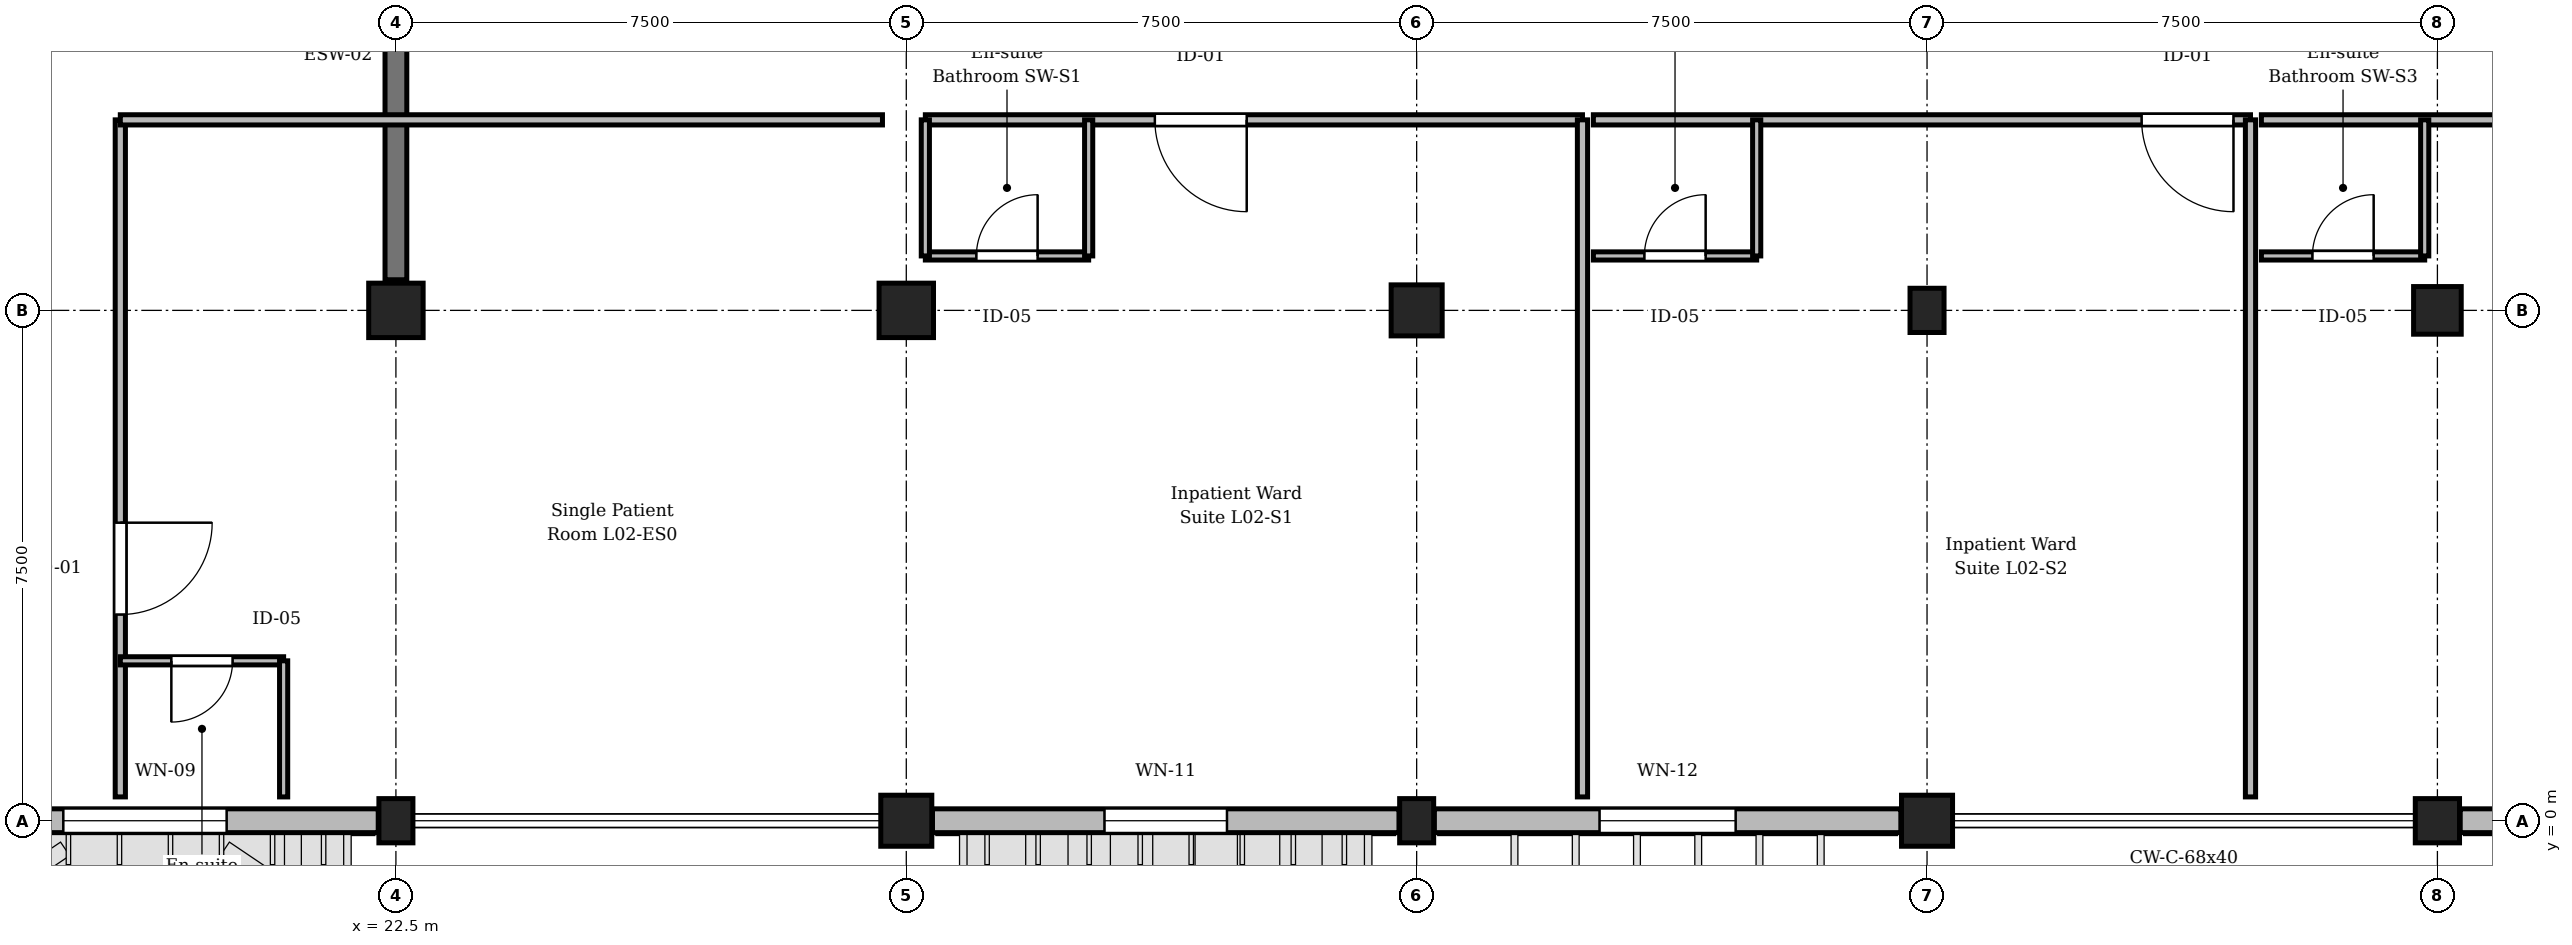
"""IFC4 building model, lengths in metres.
Left out: names, types, materials, properties, quantities, classifications, styles, units other than length and angle.
Written with IfcOpenShell. Run it as: python <this file> out.ifc"""

import sys

from ifc_helpers import new_model, si_unit, direction, frame, frame_2d, origin, origin_2d, place, context, subcontext, project, spatial, rectangle, extrude, element, fill, save


model = new_model("IFC4")
c1 = context("Model", 3, precision=1e-05, world=origin(), true_north=direction((0.0, 1.0)))
c2 = subcontext(c1, "Body", "Model", "MODEL_VIEW")
j1 = project(units=[si_unit("LENGTHUNIT", "METRE"), si_unit("PLANEANGLEUNIT", "RADIAN")], contexts=[c1])
p1 = place(None, origin())
s1 = spatial("IfcSite", under=j1, at=p1, CompositionType="ELEMENT")
p2 = place(p1, origin())
s2 = spatial("IfcBuilding", under=s1, at=p2, CompositionType="ELEMENT")
p3 = place(p2, frame((0.0, 0.0, 9.3)))
s3 = spatial("IfcBuildingStorey", under=s2, at=p3, CompositionType="ELEMENT", Elevation=9.3)
p4 = place(p3, frame((22.5, 0.0, 0.0), z_axis=(0.0, 0.0, 1.0), x_axis=(1.0, 0.0, 0.0)))
e1 = element("IfcColumn", 1, at=p4, inside=s3, PredefinedType="COLUMN", context=c2, shape_type="SweptSolid", body=[
    extrude(rectangle(XDim=0.5, YDim=0.65, at=origin_2d()), origin(), (0.0, 0.0, 1.0), 4.8),
])
p5 = place(p3, frame((22.5, 7.5, 0.0), z_axis=(0.0, 0.0, 1.0), x_axis=(1.0, 0.0, 0.0)))
e2 = element("IfcColumn", 2, at=p5, inside=s3, PredefinedType="COLUMN", context=c2, shape_type="SweptSolid", body=[
    extrude(rectangle(XDim=0.8, YDim=0.8, at=origin_2d()), origin(), (0.0, 0.0, 1.0), 4.8),
])
p6 = place(p3, frame((30.0, 0.0, 0.0), z_axis=(0.0, 0.0, 1.0), x_axis=(1.0, 0.0, 0.0)))
e3 = element("IfcColumn", 3, at=p6, inside=s3, PredefinedType="COLUMN", context=c2, shape_type="SweptSolid", body=[
    extrude(rectangle(XDim=0.75, YDim=0.75, at=origin_2d()), origin(), (0.0, 0.0, 1.0), 4.8),
])
p7 = place(p3, frame((30.0, 7.5, 0.0), z_axis=(0.0, 0.0, 1.0), x_axis=(1.0, 0.0, 0.0)))
e4 = element("IfcColumn", 4, at=p7, inside=s3, PredefinedType="COLUMN", context=c2, shape_type="SweptSolid", body=[
    extrude(rectangle(XDim=0.8, YDim=0.8, at=origin_2d()), origin(), (0.0, 0.0, 1.0), 4.8),
])
p8 = place(p3, frame((37.5, 0.0, 0.0), z_axis=(0.0, 0.0, 1.0), x_axis=(1.0, 0.0, 0.0)))
e5 = element("IfcColumn", 5, at=p8, inside=s3, PredefinedType="COLUMN", context=c2, shape_type="SweptSolid", body=[
    extrude(rectangle(XDim=0.5, YDim=0.65, at=origin_2d()), origin(), (0.0, 0.0, 1.0), 4.8),
])
for number, where, z_axis, x_axis in (
    (6, (37.5, 7.5, 0.0), (0.0, 0.0, 1.0), (1.0, 0.0, 0.0)),
    (7, (45.0, 0.0, 0.0), (0.0, 0.0, 1.0), (1.0, 0.0, 0.0)),
):
    element("IfcColumn", number, at=place(p3, frame(where, z_axis=z_axis, x_axis=x_axis)), inside=s3, PredefinedType="COLUMN", context=c2, shape_type="SweptSolid", body=[
        extrude(rectangle(XDim=0.75, YDim=0.75, at=origin_2d()), origin(), (0.0, 0.0, 1.0), 4.8),
    ])
p9 = place(p3, frame((45.0, 7.5, 0.0), z_axis=(0.0, 0.0, 1.0), x_axis=(1.0, 0.0, 0.0)))
e8 = element("IfcColumn", 8, at=p9, inside=s3, PredefinedType="COLUMN", context=c2, shape_type="SweptSolid", body=[
    extrude(rectangle(XDim=0.5, YDim=0.65, at=origin_2d()), origin(), (0.0, 0.0, 1.0), 4.8),
])
p10 = place(p3, frame((52.5, 0.0, 0.0), z_axis=(0.0, 0.0, 1.0), x_axis=(1.0, 0.0, 0.0)))
e9 = element("IfcColumn", 9, at=p10, inside=s3, PredefinedType="COLUMN", context=c2, shape_type="SweptSolid", body=[
    extrude(rectangle(XDim=0.65, YDim=0.65, at=origin_2d()), origin(), (0.0, 0.0, 1.0), 4.8),
])
p11 = place(p3, frame((52.5, 7.5, 0.0), z_axis=(0.0, 0.0, 1.0), x_axis=(1.0, 0.0, 0.0)))
e10 = element("IfcColumn", 10, at=p11, inside=s3, PredefinedType="COLUMN", context=c2, shape_type="SweptSolid", body=[
    extrude(rectangle(XDim=0.7, YDim=0.7, at=origin_2d()), origin(), (0.0, 0.0, 1.0), 4.8),
])
p12 = place(p3, frame((22.5, 7.95, 0.0), z_axis=(0.0, 0.0, 1.0), x_axis=(0.0, 1.0, 0.0)))
e11 = element("IfcWall", 11, at=p12, inside=s3, PredefinedType="SHEAR", context=c2, shape_type="SweptSolid", body=[
    extrude(rectangle(XDim=6.6, YDim=0.32, at=frame_2d((3.3, 0.0))), origin(), (0.0, 0.0, 1.0), 4.0),
])
p13 = place(p3, frame((22.24, 0.0, 0.0), z_axis=(0.0, 0.0, 1.0), x_axis=(-1.0, 0.0, 0.0)))
e12 = element("IfcWall", 12, at=p13, inside=s3, PredefinedType="STANDARD", context=c2, shape_type="SweptSolid", body=[
    extrude(rectangle(XDim=6.855, YDim=0.35, at=frame_2d((3.427, 0.0))), origin(), (0.0, 0.0, 1.0), 3.95),
])
p14 = place(p13, frame((2.228, 0.0, 0.9)))
e13 = element("IfcOpeningElement", 13, at=p14, cuts=e12, PredefinedType="OPENING", context=c2, shape_type="SweptSolid", body=[
    extrude(rectangle(XDim=2.4, YDim=2.1, at=frame_2d((1.2, 1.05))), frame((0.0, 0.185, 0.0), z_axis=(0.0, -1.0, 0.0), x_axis=(1.0, 0.0, 0.0)), (0.0, 0.0, 1.0), 0.37),
])
p15 = place(p3, frame((37.24, 0.0, 0.0), z_axis=(0.0, 0.0, 1.0), x_axis=(-1.0, 0.0, 0.0)))
e14 = element("IfcWall", 14, at=p15, inside=s3, PredefinedType="STANDARD", context=c2, shape_type="SweptSolid", body=[
    extrude(rectangle(XDim=6.855, YDim=0.35, at=frame_2d((3.427, 0.0))), origin(), (0.0, 0.0, 1.0), 3.95),
])
p16 = place(p15, frame((2.528, 0.0, 0.9)))
e15 = element("IfcOpeningElement", 15, at=p16, cuts=e14, PredefinedType="OPENING", context=c2, shape_type="SweptSolid", body=[
    extrude(rectangle(XDim=1.8, YDim=1.95, at=frame_2d((0.9, 0.975))), frame((0.0, 0.185, 0.0), z_axis=(0.0, -1.0, 0.0), x_axis=(1.0, 0.0, 0.0)), (0.0, 0.0, 1.0), 0.37),
])
p17 = place(p3, frame((44.615, 0.0, 0.0), z_axis=(0.0, 0.0, 1.0), x_axis=(-1.0, 0.0, 0.0)))
e16 = element("IfcWall", 16, at=p17, inside=s3, PredefinedType="STANDARD", context=c2, shape_type="SweptSolid", body=[
    extrude(rectangle(XDim=6.855, YDim=0.35, at=frame_2d((3.427, 0.0))), origin(), (0.0, 0.0, 1.0), 3.95),
])
p18 = place(p17, frame((2.427, 0.0, 0.9)))
e17 = element("IfcOpeningElement", 17, at=p18, cuts=e16, PredefinedType="OPENING", context=c2, shape_type="SweptSolid", body=[
    extrude(rectangle(XDim=2.0, YDim=1.95, at=frame_2d((1.0, 0.975))), frame((0.0, 0.185, 0.0), z_axis=(0.0, -1.0, 0.0), x_axis=(1.0, 0.0, 0.0)), (0.0, 0.0, 1.0), 0.37),
])
p19 = place(p3, frame((59.69, 0.0, 0.0), z_axis=(0.0, 0.0, 1.0), x_axis=(-1.0, 0.0, 0.0)))
e18 = element("IfcWall", 18, at=p19, inside=s3, PredefinedType="STANDARD", context=c2, shape_type="SweptSolid", body=[
    extrude(rectangle(XDim=6.855, YDim=0.35, at=frame_2d((3.427, 0.0))), origin(), (0.0, 0.0, 1.0), 3.95),
])
p20 = place(p19, frame((2.728, 0.0, 0.9)))
e19 = element("IfcOpeningElement", 19, at=p20, cuts=e18, PredefinedType="OPENING", context=c2, shape_type="SweptSolid", body=[
    extrude(rectangle(XDim=1.4, YDim=1.8, at=frame_2d((0.7, 0.9))), frame((0.0, 0.185, 0.0), z_axis=(0.0, -1.0, 0.0), x_axis=(1.0, 0.0, 0.0)), (0.0, 0.0, 1.0), 0.37),
])
p21 = place(p3, frame((18.45, 10.3, 0.0), z_axis=(0.0, 0.0, 1.0), x_axis=(0.0, -1.0, 0.0)))
e20 = element("IfcWall", 20, at=p21, inside=s3, PredefinedType="PARTITIONING", context=c2, shape_type="SweptSolid", body=[
    extrude(rectangle(XDim=9.95, YDim=0.15, at=frame_2d((4.975, 0.0))), origin(), (0.0, 0.0, 1.0), 4.535),
])
p22 = place(p21, frame((5.92, 0.0, 0.0)))
e21 = element("IfcOpeningElement", 21, at=p22, cuts=e20, PredefinedType="OPENING", context=c2, shape_type="SweptSolid", body=[
    extrude(rectangle(XDim=1.35, YDim=2.25, at=frame_2d((0.675, 1.125))), frame((0.0, 0.085, 0.0), z_axis=(0.0, -1.0, 0.0), x_axis=(1.0, 0.0, 0.0)), (0.0, 0.0, 1.0), 0.17),
])
p23 = place(p3, frame((20.85, 2.35, 0.0), z_axis=(0.0, 0.0, 1.0), x_axis=(-1.0, 0.0, 0.0)))
e22 = element("IfcWall", 22, at=p23, inside=s3, PredefinedType="PARTITIONING", context=c2, shape_type="SweptSolid", body=[
    extrude(rectangle(XDim=2.4, YDim=0.12, at=frame_2d((1.2, 0.0))), origin(), (0.0, 0.0, 1.0), 4.535),
])
p24 = place(p23, frame((0.75, 0.0, 0.0)))
e23 = element("IfcOpeningElement", 23, at=p24, cuts=e22, PredefinedType="OPENING", context=c2, shape_type="SweptSolid", body=[
    extrude(rectangle(XDim=0.9, YDim=2.1, at=frame_2d((0.45, 1.05))), frame((0.0, 0.07, 0.0), z_axis=(0.0, -1.0, 0.0), x_axis=(1.0, 0.0, 0.0)), (0.0, 0.0, 1.0), 0.14),
])
p25 = place(p3, frame((20.85, 0.35, 0.0), z_axis=(0.0, 0.0, 1.0), x_axis=(0.0, 1.0, 0.0)))
e24 = element("IfcWall", 24, at=p25, inside=s3, PredefinedType="PARTITIONING", context=c2, shape_type="SweptSolid", body=[
    extrude(rectangle(XDim=2.0, YDim=0.12, at=frame_2d((1.0, 0.0))), origin(), (0.0, 0.0, 1.0), 4.535),
])
p26 = place(p3, frame((39.937, 10.3, 0.0), z_axis=(0.0, 0.0, 1.0), x_axis=(-1.0, 0.0, 0.0)))
e25 = element("IfcWall", 25, at=p26, inside=s3, PredefinedType="PARTITIONING", context=c2, shape_type="SweptSolid", body=[
    extrude(rectangle(XDim=9.657, YDim=0.15, at=frame_2d((4.828, 0.0))), origin(), (0.0, 0.0, 1.0), 4.535),
])
p27 = place(p26, frame((4.934, 0.0, 0.0)))
e26 = element("IfcOpeningElement", 26, at=p27, cuts=e25, PredefinedType="OPENING", context=c2, shape_type="SweptSolid", body=[
    extrude(rectangle(XDim=1.35, YDim=2.25, at=frame_2d((0.675, 1.125))), frame((0.0, 0.085, 0.0), z_axis=(0.0, -1.0, 0.0), x_axis=(1.0, 0.0, 0.0)), (0.0, 0.0, 1.0), 0.17),
])
p28 = place(p3, frame((30.28, 8.3, 0.0), z_axis=(0.0, 0.0, 1.0), x_axis=(1.0, 0.0, 0.0)))
e27 = element("IfcWall", 27, at=p28, inside=s3, PredefinedType="PARTITIONING", context=c2, shape_type="SweptSolid", body=[
    extrude(rectangle(XDim=2.4, YDim=0.12, at=frame_2d((1.2, 0.0))), origin(), (0.0, 0.0, 1.0), 4.535),
])
p29 = place(p28, frame((0.75, 0.0, 0.0)))
e28 = element("IfcOpeningElement", 28, at=p29, cuts=e27, PredefinedType="OPENING", context=c2, shape_type="SweptSolid", body=[
    extrude(rectangle(XDim=0.9, YDim=2.1, at=frame_2d((0.45, 1.05))), frame((0.0, 0.07, 0.0), z_axis=(0.0, -1.0, 0.0), x_axis=(1.0, 0.0, 0.0)), (0.0, 0.0, 1.0), 0.14),
])
p30 = place(p3, frame((32.68, 8.3, 0.0), z_axis=(0.0, 0.0, 1.0), x_axis=(0.0, 1.0, 0.0)))
e29 = element("IfcWall", 29, at=p30, inside=s3, PredefinedType="PARTITIONING", context=c2, shape_type="SweptSolid", body=[
    extrude(rectangle(XDim=2.0, YDim=0.12, at=frame_2d((1.0, 0.0))), origin(), (0.0, 0.0, 1.0), 4.535),
])
p31 = place(p3, frame((49.753, 10.3, 0.0), z_axis=(0.0, 0.0, 1.0), x_axis=(-1.0, 0.0, 0.0)))
e30 = element("IfcWall", 30, at=p31, inside=s3, PredefinedType="PARTITIONING", context=c2, shape_type="SweptSolid", body=[
    extrude(rectangle(XDim=9.657, YDim=0.15, at=frame_2d((4.828, 0.0))), origin(), (0.0, 0.0, 1.0), 4.535),
])
p32 = place(p31, frame((0.25, 0.0, 0.0)))
e31 = element("IfcOpeningElement", 31, at=p32, cuts=e30, PredefinedType="OPENING", context=c2, shape_type="SweptSolid", body=[
    extrude(rectangle(XDim=1.35, YDim=2.25, at=frame_2d((0.675, 1.125))), frame((0.0, 0.085, 0.0), z_axis=(0.0, -1.0, 0.0), x_axis=(1.0, 0.0, 0.0)), (0.0, 0.0, 1.0), 0.17),
])
p33 = place(p3, frame((40.097, 8.3, 0.0), z_axis=(0.0, 0.0, 1.0), x_axis=(1.0, 0.0, 0.0)))
e32 = element("IfcWall", 32, at=p33, inside=s3, PredefinedType="PARTITIONING", context=c2, shape_type="SweptSolid", body=[
    extrude(rectangle(XDim=2.4, YDim=0.12, at=frame_2d((1.2, 0.0))), origin(), (0.0, 0.0, 1.0), 4.535),
])
p34 = place(p33, frame((0.75, 0.0, 0.0)))
e33 = element("IfcOpeningElement", 33, at=p34, cuts=e32, PredefinedType="OPENING", context=c2, shape_type="SweptSolid", body=[
    extrude(rectangle(XDim=0.9, YDim=2.1, at=frame_2d((0.45, 1.05))), frame((0.0, 0.07, 0.0), z_axis=(0.0, -1.0, 0.0), x_axis=(1.0, 0.0, 0.0)), (0.0, 0.0, 1.0), 0.14),
])
p35 = place(p3, frame((42.497, 8.3, 0.0), z_axis=(0.0, 0.0, 1.0), x_axis=(0.0, 1.0, 0.0)))
e34 = element("IfcWall", 34, at=p35, inside=s3, PredefinedType="PARTITIONING", context=c2, shape_type="SweptSolid", body=[
    extrude(rectangle(XDim=2.0, YDim=0.12, at=frame_2d((1.0, 0.0))), origin(), (0.0, 0.0, 1.0), 4.535),
])
p36 = place(p3, frame((59.57, 10.3, 0.0), z_axis=(0.0, 0.0, 1.0), x_axis=(-1.0, 0.0, 0.0)))
e35 = element("IfcWall", 35, at=p36, inside=s3, PredefinedType="PARTITIONING", context=c2, shape_type="SweptSolid", body=[
    extrude(rectangle(XDim=9.657, YDim=0.15, at=frame_2d((4.828, 0.0))), origin(), (0.0, 0.0, 1.0), 4.535),
])
p37 = place(p36, frame((2.592, 0.0, 0.0)))
e36 = element("IfcOpeningElement", 36, at=p37, cuts=e35, PredefinedType="OPENING", context=c2, shape_type="SweptSolid", body=[
    extrude(rectangle(XDim=1.35, YDim=2.25, at=frame_2d((0.675, 1.125))), frame((0.0, 0.085, 0.0), z_axis=(0.0, -1.0, 0.0), x_axis=(1.0, 0.0, 0.0)), (0.0, 0.0, 1.0), 0.17),
])
p38 = place(p3, frame((49.913, 8.3, 0.0), z_axis=(0.0, 0.0, 1.0), x_axis=(1.0, 0.0, 0.0)))
e37 = element("IfcWall", 37, at=p38, inside=s3, PredefinedType="PARTITIONING", context=c2, shape_type="SweptSolid", body=[
    extrude(rectangle(XDim=2.4, YDim=0.12, at=frame_2d((1.2, 0.0))), origin(), (0.0, 0.0, 1.0), 4.535),
])
p39 = place(p38, frame((0.75, 0.0, 0.0)))
e38 = element("IfcOpeningElement", 38, at=p39, cuts=e37, PredefinedType="OPENING", context=c2, shape_type="SweptSolid", body=[
    extrude(rectangle(XDim=0.9, YDim=2.1, at=frame_2d((0.45, 1.05))), frame((0.0, 0.07, 0.0), z_axis=(0.0, -1.0, 0.0), x_axis=(1.0, 0.0, 0.0)), (0.0, 0.0, 1.0), 0.14),
])
p40 = place(p3, frame((52.313, 8.3, 0.0), z_axis=(0.0, 0.0, 1.0), x_axis=(0.0, 1.0, 0.0)))
e39 = element("IfcWall", 39, at=p40, inside=s3, PredefinedType="PARTITIONING", context=c2, shape_type="SweptSolid", body=[
    extrude(rectangle(XDim=2.0, YDim=0.12, at=frame_2d((1.0, 0.0))), origin(), (0.0, 0.0, 1.0), 3.985),
])
p41 = place(p3, frame((18.45, 10.3, 0.0), z_axis=(0.0, 0.0, 1.0), x_axis=(1.0, 0.0, 0.0)))
e40 = element("IfcWall", 40, at=p41, inside=s3, PredefinedType="PARTITIONING", context=c2, shape_type="SweptSolid", body=[
    extrude(rectangle(XDim=11.2, YDim=0.15, at=frame_2d((5.6, 0.0))), origin(), (0.0, 0.0, 1.0), 4.535),
])
for number, where, z_axis, x_axis in (
    (41, (39.937, 0.35, 0.0), (0.0, 0.0, 1.0), (0.0, 1.0, 0.0)),
    (42, (49.753, 0.35, 0.0), (0.0, 0.0, 1.0), (0.0, 1.0, 0.0)),
):
    element("IfcWall", number, at=place(p3, frame(where, z_axis=z_axis, x_axis=x_axis)), inside=s3, PredefinedType="PARTITIONING", context=c2, shape_type="SweptSolid", body=[
        extrude(rectangle(XDim=9.95, YDim=0.15, at=frame_2d((4.975, 0.0))), origin(), (0.0, 0.0, 1.0), 4.535),
    ])
p42 = place(p3, frame((30.28, 8.3, 0.0), z_axis=(0.0, 0.0, 1.0), x_axis=(0.0, 1.0, 0.0)))
e43 = element("IfcWall", 43, at=p42, inside=s3, PredefinedType="PARTITIONING", context=c2, shape_type="SweptSolid", body=[
    extrude(rectangle(XDim=2.0, YDim=0.12, at=frame_2d((1.0, 0.0))), origin(), (0.0, 0.0, 1.0), 4.035),
])
p43 = place(p14, origin())
e44 = element("IfcWindow", 44, at=p43, inside=s3, PartitioningType="SINGLE_PANEL", PredefinedType="WINDOW", context=c2, shape_type="SweptSolid", body=[
    extrude(rectangle(XDim=2.4, YDim=2.1, at=frame_2d((1.2, 1.05))), frame((0.0, 0.03, 0.0), z_axis=(0.0, -1.0, 0.0), x_axis=(1.0, 0.0, 0.0)), (0.0, 0.0, 1.0), 0.06),
])
fill(e13, e44)
p44 = place(p16, origin())
e45 = element("IfcWindow", 45, at=p44, inside=s3, PartitioningType="SINGLE_PANEL", PredefinedType="WINDOW", context=c2, shape_type="SweptSolid", body=[
    extrude(rectangle(XDim=1.8, YDim=1.95, at=frame_2d((0.9, 0.975))), frame((0.0, 0.03, 0.0), z_axis=(0.0, -1.0, 0.0), x_axis=(1.0, 0.0, 0.0)), (0.0, 0.0, 1.0), 0.06),
])
fill(e15, e45)
p45 = place(p18, origin())
e46 = element("IfcWindow", 46, at=p45, inside=s3, PartitioningType="SINGLE_PANEL", PredefinedType="WINDOW", context=c2, shape_type="SweptSolid", body=[
    extrude(rectangle(XDim=2.0, YDim=1.95, at=frame_2d((1.0, 0.975))), frame((0.0, 0.03, 0.0), z_axis=(0.0, -1.0, 0.0), x_axis=(1.0, 0.0, 0.0)), (0.0, 0.0, 1.0), 0.06),
])
fill(e17, e46)
p46 = place(p22, origin())
e47 = element("IfcDoor", 47, at=p46, inside=s3, OperationType="SINGLE_SWING_LEFT", PredefinedType="DOOR", context=c2, shape_type="SweptSolid", body=[
    extrude(rectangle(XDim=1.35, YDim=2.25, at=frame_2d((0.675, 1.125))), frame((0.0, 0.025, 0.0), z_axis=(0.0, -1.0, 0.0), x_axis=(1.0, 0.0, 0.0)), (0.0, 0.0, 1.0), 0.05),
])
fill(e21, e47)
p47 = place(p24, origin())
e48 = element("IfcDoor", 48, at=p47, inside=s3, OperationType="SINGLE_SWING_RIGHT", PredefinedType="DOOR", context=c2, shape_type="SweptSolid", body=[
    extrude(rectangle(XDim=0.9, YDim=2.1, at=frame_2d((0.45, 1.05))), frame((0.0, 0.025, 0.0), z_axis=(0.0, -1.0, 0.0), x_axis=(1.0, 0.0, 0.0)), (0.0, 0.0, 1.0), 0.05),
])
fill(e23, e48)
p48 = place(p27, origin())
e49 = element("IfcDoor", 49, at=p48, inside=s3, OperationType="SINGLE_SWING_LEFT", PredefinedType="DOOR", context=c2, shape_type="SweptSolid", body=[
    extrude(rectangle(XDim=1.35, YDim=2.25, at=frame_2d((0.675, 1.125))), frame((0.0, 0.025, 0.0), z_axis=(0.0, -1.0, 0.0), x_axis=(1.0, 0.0, 0.0)), (0.0, 0.0, 1.0), 0.05),
])
fill(e26, e49)
p49 = place(p29, origin())
e50 = element("IfcDoor", 50, at=p49, inside=s3, OperationType="SINGLE_SWING_RIGHT", PredefinedType="DOOR", context=c2, shape_type="SweptSolid", body=[
    extrude(rectangle(XDim=0.9, YDim=2.1, at=frame_2d((0.45, 1.05))), frame((0.0, 0.025, 0.0), z_axis=(0.0, -1.0, 0.0), x_axis=(1.0, 0.0, 0.0)), (0.0, 0.0, 1.0), 0.05),
])
fill(e28, e50)
p50 = place(p32, origin())
e51 = element("IfcDoor", 51, at=p50, inside=s3, OperationType="SINGLE_SWING_LEFT", PredefinedType="DOOR", context=c2, shape_type="SweptSolid", body=[
    extrude(rectangle(XDim=1.35, YDim=2.25, at=frame_2d((0.675, 1.125))), frame((0.0, 0.025, 0.0), z_axis=(0.0, -1.0, 0.0), x_axis=(1.0, 0.0, 0.0)), (0.0, 0.0, 1.0), 0.05),
])
fill(e31, e51)
p51 = place(p34, origin())
e52 = element("IfcDoor", 52, at=p51, inside=s3, OperationType="SINGLE_SWING_RIGHT", PredefinedType="DOOR", context=c2, shape_type="SweptSolid", body=[
    extrude(rectangle(XDim=0.9, YDim=2.1, at=frame_2d((0.45, 1.05))), frame((0.0, 0.025, 0.0), z_axis=(0.0, -1.0, 0.0), x_axis=(1.0, 0.0, 0.0)), (0.0, 0.0, 1.0), 0.05),
])
fill(e33, e52)
p52 = place(p39, origin())
e53 = element("IfcDoor", 53, at=p52, inside=s3, OperationType="SINGLE_SWING_RIGHT", PredefinedType="DOOR", context=c2, shape_type="SweptSolid", body=[
    extrude(rectangle(XDim=0.9, YDim=2.1, at=frame_2d((0.45, 1.05))), frame((0.0, 0.025, 0.0), z_axis=(0.0, -1.0, 0.0), x_axis=(1.0, 0.0, 0.0)), (0.0, 0.0, 1.0), 0.05),
])
fill(e38, e53)
save(model, sys.argv[1])
